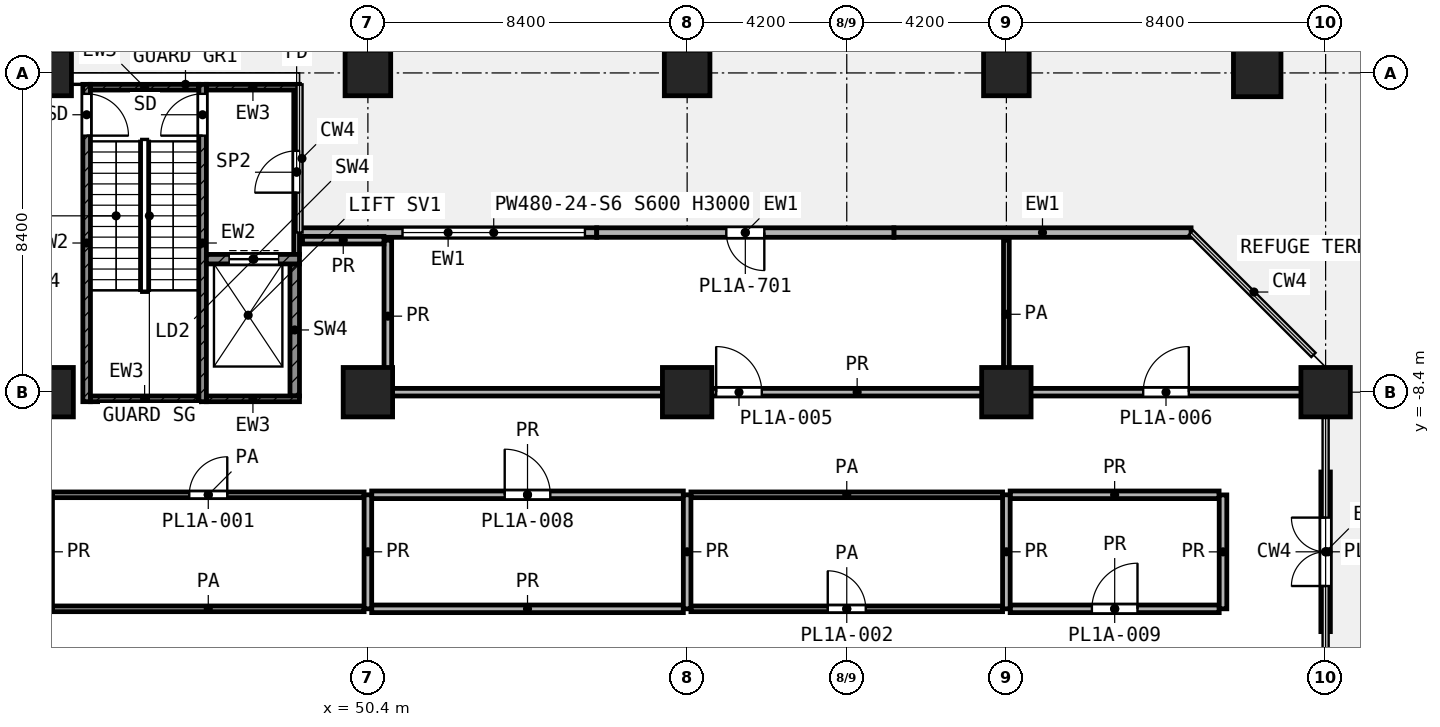
"""IFC4 building model, lengths in metres.
Left out: names, types, materials, properties, quantities, classifications, styles, units other than length and angle.
Written with IfcOpenShell. Run it as: python <this file> out.ifc"""

import sys

from ifc_helpers import new_model, si_unit, direction, frame, frame_2d, origin, origin_2d, place, context, subcontext, project, spatial, rectangle, extrude, element, fill, save


model = new_model("IFC4")
c1 = context("Model", 3, precision=1e-05, world=origin(), true_north=direction((0.0, 1.0)))
c2 = subcontext(c1, "Body", "Model", "MODEL_VIEW")
j1 = project(units=[si_unit("LENGTHUNIT", "METRE"), si_unit("PLANEANGLEUNIT", "RADIAN")], contexts=[c1])
p1 = place(None, origin())
s1 = spatial("IfcSite", under=j1, at=p1, CompositionType="ELEMENT")
p2 = place(p1, origin())
s2 = spatial("IfcBuilding", under=s1, at=p2, CompositionType="ELEMENT")
p3 = place(p2, frame((0.0, 0.0, 34.2)))
s3 = spatial("IfcBuildingStorey", under=s2, at=p3, CompositionType="ELEMENT", Elevation=34.2)
for number, where, z_axis, x_axis in (
    (1, (42.0, 0.0, 0.0), (0.0, 0.0, 1.0), (1.0, 0.0, 0.0)),
    (2, (50.4, 0.0, 0.0), (0.0, 0.0, 1.0), (1.0, 0.0, 0.0)),
    (3, (58.8, 0.0, 0.0), (0.0, 0.0, 1.0), (1.0, 0.0, 0.0)),
    (4, (67.2, 0.0, 0.0), (0.0, 0.0, 1.0), (1.0, 0.0, 0.0)),
):
    element("IfcColumn", number, at=place(p3, frame(where, z_axis=z_axis, x_axis=x_axis)), inside=s3, PredefinedType="COLUMN", context=c2, shape_type="SweptSolid", body=[
        extrude(rectangle(XDim=1.2, YDim=1.2, at=origin_2d()), origin(), (0.0, 0.0, 1.0), 5.0),
    ])
p4 = place(p3, frame((73.8, 0.0, 0.0), z_axis=(0.0, 0.0, 1.0), x_axis=(1.0, 0.0, 0.0)))
e5 = element("IfcColumn", 5, at=p4, inside=s3, PredefinedType="COLUMN", context=c2, shape_type="SweptSolid", body=[
    extrude(rectangle(XDim=1.25, YDim=1.25, at=origin_2d()), origin(), (0.0, 0.0, 1.0), 5.0),
])
for number, where, z_axis, x_axis in (
    (6, (42.0, -8.4, 0.0), (0.0, 0.0, 1.0), (1.0, 0.0, 0.0)),
    (7, (50.4, -8.4, 0.0), (0.0, 0.0, 1.0), (1.0, 0.0, 0.0)),
    (8, (58.8, -8.4, 0.0), (0.0, 0.0, 1.0), (1.0, 0.0, 0.0)),
    (9, (67.2, -8.4, 0.0), (0.0, 0.0, 1.0), (1.0, 0.0, 0.0)),
    (10, (75.6, -8.4, 0.0), (0.0, 0.0, 1.0), (1.0, 0.0, 0.0)),
):
    element("IfcColumn", number, at=place(p3, frame(where, z_axis=z_axis, x_axis=x_axis)), inside=s3, PredefinedType="COLUMN", context=c2, shape_type="SweptSolid", body=[
        extrude(rectangle(XDim=1.3, YDim=1.3, at=origin_2d()), origin(), (0.0, 0.0, 1.0), 5.0),
    ])
p5 = place(p3, frame((75.6, -14.7, 0.0), z_axis=(0.0, 0.0, 1.0), x_axis=(0.0, 1.0, 0.0)))
e11 = element("IfcWall", 11, at=p5, inside=s3, PredefinedType="SOLIDWALL", context=c2, shape_type="SweptSolid", body=[
    extrude(rectangle(XDim=4.2, YDim=0.25, at=frame_2d((2.1, 0.0))), origin(), (0.0, 0.0, 1.0), 4.42),
])
p6 = place(p5, frame((1.2, 0.0, 0.0)))
e12 = element("IfcOpeningElement", 12, at=p6, cuts=e11, PredefinedType="OPENING", context=c2, shape_type="SweptSolid", body=[
    extrude(rectangle(XDim=1.8, YDim=2.1, at=frame_2d((0.9, 1.05))), frame((0.0, 0.135, 0.0), z_axis=(0.0, -1.0, 0.0), x_axis=(1.0, 0.0, 0.0)), (0.0, 0.0, 1.0), 0.27),
])
p7 = place(p3, frame((72.06, -4.2, 0.0), z_axis=(0.0, 0.0, 1.0), x_axis=(-1.0, 0.0, 0.0)))
e13 = element("IfcWall", 13, at=p7, inside=s3, PredefinedType="SOLIDWALL", context=c2, shape_type="SweptSolid", body=[
    extrude(rectangle(XDim=7.82, YDim=0.25, at=frame_2d((3.91, 0.0))), origin(), (0.0, 0.0, 1.0), 4.58),
])
p8 = place(p3, frame((64.24, -4.2, 0.0), z_axis=(0.0, 0.0, 1.0), x_axis=(-1.0, 0.0, 0.0)))
e14 = element("IfcWall", 14, at=p8, inside=s3, PredefinedType="SOLIDWALL", context=c2, shape_type="SweptSolid", body=[
    extrude(rectangle(XDim=7.82, YDim=0.25, at=frame_2d((3.91, 0.0))), origin(), (0.0, 0.0, 1.0), 4.58),
])
p9 = place(p8, frame((3.409, 0.0, 0.0)))
e15 = element("IfcOpeningElement", 15, at=p9, cuts=e14, PredefinedType="OPENING", context=c2, shape_type="SweptSolid", body=[
    extrude(rectangle(XDim=1.0, YDim=2.1, at=frame_2d((0.5, 1.05))), frame((0.0, 0.135, 0.0), z_axis=(0.0, -1.0, 0.0), x_axis=(1.0, 0.0, 0.0)), (0.0, 0.0, 1.0), 0.27),
])
p10 = place(p3, frame((56.421, -4.2, 0.0), z_axis=(0.0, 0.0, 1.0), x_axis=(-1.0, 0.0, 0.0)))
e16 = element("IfcWall", 16, at=p10, inside=s3, PredefinedType="SOLIDWALL", context=c2, shape_type="SweptSolid", body=[
    extrude(rectangle(XDim=7.82, YDim=0.25, at=frame_2d((3.91, 0.0))), origin(), (0.0, 0.0, 1.0), 4.58),
])
p11 = place(p10, frame((0.31, 0.0, 0.6)))
e17 = element("IfcOpeningElement", 17, at=p11, cuts=e16, PredefinedType="OPENING", context=c2, shape_type="SweptSolid", body=[
    extrude(rectangle(XDim=4.8, YDim=2.4, at=frame_2d((2.4, 1.2))), frame((0.0, 0.135, 0.0), z_axis=(0.0, -1.0, 0.0), x_axis=(1.0, 0.0, 0.0)), (0.0, 0.0, 1.0), 0.27),
])
p12 = place(p3, frame((43.0, -8.65, 0.0), z_axis=(0.0, 0.0, 1.0), x_axis=(0.0, 1.0, 0.0)))
e18 = element("IfcWall", 18, at=p12, inside=s3, PredefinedType="SHEAR", context=c2, shape_type="SweptSolid", body=[
    extrude(rectangle(XDim=8.35, YDim=0.2, at=frame_2d((4.175, 0.0))), origin(), (0.0, 0.0, 1.0), 4.58),
])
p13 = place(p12, frame((7.0, 0.0, 0.0)))
e19 = element("IfcOpeningElement", 19, at=p13, cuts=e18, PredefinedType="OPENING", context=c2, shape_type="SweptSolid", body=[
    extrude(rectangle(XDim=1.1, YDim=2.1, at=frame_2d((0.55, 1.05))), frame((0.0, 0.11, 0.0), z_axis=(0.0, -1.0, 0.0), x_axis=(1.0, 0.0, 0.0)), (0.0, 0.0, 1.0), 0.22),
])
p14 = place(p3, frame((46.05, -8.65, 0.0), z_axis=(0.0, 0.0, 1.0), x_axis=(0.0, 1.0, 0.0)))
e20 = element("IfcWall", 20, at=p14, inside=s3, PredefinedType="SHEAR", context=c2, shape_type="SweptSolid", body=[
    extrude(rectangle(XDim=8.35, YDim=0.2, at=frame_2d((4.175, 0.0))), origin(), (0.0, 0.0, 1.0), 4.58),
])
p15 = place(p14, frame((7.0, 0.0, 0.0)))
e21 = element("IfcOpeningElement", 21, at=p15, cuts=e20, PredefinedType="OPENING", context=c2, shape_type="SweptSolid", body=[
    extrude(rectangle(XDim=1.1, YDim=2.1, at=frame_2d((0.55, 1.05))), frame((0.0, 0.11, 0.0), z_axis=(0.0, -1.0, 0.0), x_axis=(1.0, 0.0, 0.0)), (0.0, 0.0, 1.0), 0.22),
])
p16 = place(p3, frame((43.1, -0.375, 0.0), z_axis=(0.0, 0.0, 1.0), x_axis=(1.0, 0.0, 0.0)))
e22 = element("IfcWall", 22, at=p16, inside=s3, PredefinedType="SHEAR", context=c2, shape_type="SweptSolid", body=[
    extrude(rectangle(XDim=2.85, YDim=0.15, at=frame_2d((1.425, 0.0))), origin(), (0.0, 0.0, 1.0), 4.58),
])
p17 = place(p3, frame((46.15, -0.375, 0.0), z_axis=(0.0, 0.0, 1.0), x_axis=(1.0, 0.0, 0.0)))
e23 = element("IfcWall", 23, at=p17, inside=s3, PredefinedType="SHEAR", context=c2, shape_type="SweptSolid", body=[
    extrude(rectangle(XDim=2.45, YDim=0.15, at=frame_2d((1.225, 0.0))), origin(), (0.0, 0.0, 1.0), 4.58),
])
p18 = place(p3, frame((43.1, -8.575, 0.0), z_axis=(0.0, 0.0, 1.0), x_axis=(1.0, 0.0, 0.0)))
e24 = element("IfcWall", 24, at=p18, inside=s3, PredefinedType="SHEAR", context=c2, shape_type="SweptSolid", body=[
    extrude(rectangle(XDim=2.85, YDim=0.15, at=frame_2d((1.425, 0.0))), origin(), (0.0, 0.0, 1.0), 4.58),
])
p19 = place(p3, frame((46.15, -8.575, 0.0), z_axis=(0.0, 0.0, 1.0), x_axis=(1.0, 0.0, 0.0)))
e25 = element("IfcWall", 25, at=p19, inside=s3, PredefinedType="SHEAR", context=c2, shape_type="SweptSolid", body=[
    extrude(rectangle(XDim=2.45, YDim=0.15, at=frame_2d((1.225, 0.0))), origin(), (0.0, 0.0, 1.0), 4.58),
])
p20 = place(p3, frame((46.15, -4.9, 0.0), z_axis=(0.0, 0.0, 1.0), x_axis=(1.0, 0.0, 0.0)))
e26 = element("IfcWall", 26, at=p20, inside=s3, PredefinedType="SHEAR", context=c2, shape_type="SweptSolid", body=[
    extrude(rectangle(XDim=2.45, YDim=0.25, at=frame_2d((1.225, 0.0))), origin(), (0.0, 0.0, 1.0), 4.58),
])
p21 = place(p20, frame((0.6, 0.0, 0.0)))
e27 = element("IfcOpeningElement", 27, at=p21, cuts=e26, PredefinedType="OPENING", context=c2, shape_type="SweptSolid", body=[
    extrude(rectangle(XDim=1.3, YDim=2.1, at=frame_2d((0.65, 1.05))), frame((0.0, 0.135, 0.0), z_axis=(0.0, -1.0, 0.0), x_axis=(1.0, 0.0, 0.0)), (0.0, 0.0, 1.0), 0.27),
])
p22 = place(p3, frame((48.475, -8.5, 0.0), z_axis=(0.0, 0.0, 1.0), x_axis=(0.0, 1.0, 0.0)))
e28 = element("IfcWall", 28, at=p22, inside=s3, PredefinedType="SHEAR", context=c2, shape_type="SweptSolid", body=[
    extrude(rectangle(XDim=3.475, YDim=0.25, at=frame_2d((1.738, 0.0))), origin(), (0.0, 0.0, 1.0), 4.58),
])
p23 = place(p3, frame((48.525, -4.775, 0.0), z_axis=(0.0, 0.0, 1.0), x_axis=(0.0, 1.0, 0.0)))
e29 = element("IfcWall", 29, at=p23, inside=s3, PredefinedType="PARTITIONING", context=c2, shape_type="SweptSolid", body=[
    extrude(rectangle(XDim=4.325, YDim=0.15, at=frame_2d((2.163, 0.0))), origin(), (0.0, 0.0, 1.0), 4.58),
])
p24 = place(p23, frame((1.625, 0.0, 0.0)))
e30 = element("IfcOpeningElement", 30, at=p24, cuts=e29, PredefinedType="OPENING", context=c2, shape_type="SweptSolid", body=[
    extrude(rectangle(XDim=1.1, YDim=2.1, at=frame_2d((0.55, 1.05))), frame((0.0, 0.085, 0.0), z_axis=(0.0, -1.0, 0.0), x_axis=(1.0, 0.0, 0.0)), (0.0, 0.0, 1.0), 0.17),
])
p25 = place(p3, frame((42.1, -14.1, 0.0), z_axis=(0.0, 0.0, 1.0), x_axis=(1.0, 0.0, 0.0)))
e31 = element("IfcWall", 31, at=p25, inside=s3, PredefinedType="PARTITIONING", context=c2, shape_type="SweptSolid", body=[
    extrude(rectangle(XDim=8.2, YDim=0.15, at=frame_2d((4.1, 0.0))), origin(), (0.0, 0.0, 1.0), 4.58),
])
p26 = place(p3, frame((58.9, -14.1, 0.0), z_axis=(0.0, 0.0, 1.0), x_axis=(1.0, 0.0, 0.0)))
e32 = element("IfcWall", 32, at=p26, inside=s3, PredefinedType="PARTITIONING", context=c2, shape_type="SweptSolid", body=[
    extrude(rectangle(XDim=8.2, YDim=0.15, at=frame_2d((4.1, 0.0))), origin(), (0.0, 0.0, 1.0), 4.58),
])
p27 = place(p26, frame((3.6, 0.0, 0.0)))
e33 = element("IfcOpeningElement", 33, at=p27, cuts=e32, PredefinedType="OPENING", context=c2, shape_type="SweptSolid", body=[
    extrude(rectangle(XDim=1.0, YDim=2.1, at=frame_2d((0.5, 1.05))), frame((0.0, 0.085, 0.0), z_axis=(0.0, -1.0, 0.0), x_axis=(1.0, 0.0, 0.0)), (0.0, 0.0, 1.0), 0.17),
])
p28 = place(p3, frame((42.1, -11.1, 0.0), z_axis=(0.0, 0.0, 1.0), x_axis=(1.0, 0.0, 0.0)))
e34 = element("IfcWall", 34, at=p28, inside=s3, PredefinedType="PARTITIONING", context=c2, shape_type="SweptSolid", body=[
    extrude(rectangle(XDim=8.2, YDim=0.15, at=frame_2d((4.1, 0.0))), origin(), (0.0, 0.0, 1.0), 4.58),
])
p29 = place(p28, frame((3.6, 0.0, 0.0)))
e35 = element("IfcOpeningElement", 35, at=p29, cuts=e34, PredefinedType="OPENING", context=c2, shape_type="SweptSolid", body=[
    extrude(rectangle(XDim=1.0, YDim=2.1, at=frame_2d((0.5, 1.05))), frame((0.0, 0.085, 0.0), z_axis=(0.0, -1.0, 0.0), x_axis=(1.0, 0.0, 0.0)), (0.0, 0.0, 1.0), 0.17),
])
p30 = place(p3, frame((58.9, -11.1, 0.0), z_axis=(0.0, 0.0, 1.0), x_axis=(1.0, 0.0, 0.0)))
e36 = element("IfcWall", 36, at=p30, inside=s3, PredefinedType="PARTITIONING", context=c2, shape_type="SweptSolid", body=[
    extrude(rectangle(XDim=8.2, YDim=0.15, at=frame_2d((4.1, 0.0))), origin(), (0.0, 0.0, 1.0), 4.58),
])
p31 = place(p3, frame((67.2, -8.3, 0.0), z_axis=(0.0, 0.0, 1.0), x_axis=(0.0, 1.0, 0.0)))
e37 = element("IfcWall", 37, at=p31, inside=s3, PredefinedType="PARTITIONING", context=c2, shape_type="SweptSolid", body=[
    extrude(rectangle(XDim=3.9, YDim=0.15, at=frame_2d((1.95, 0.0))), origin(), (0.0, 0.0, 1.0), 4.58),
])
p32 = place(p3, frame((50.5, -14.1, 0.0), z_axis=(0.0, 0.0, 1.0), x_axis=(1.0, 0.0, 0.0)))
e38 = element("IfcWall", 38, at=p32, inside=s3, PredefinedType="PARTITIONING", context=c2, shape_type="SweptSolid", body=[
    extrude(rectangle(XDim=8.2, YDim=0.2, at=frame_2d((4.1, 0.0))), origin(), (0.0, 0.0, 1.0), 4.58),
])
p33 = place(p3, frame((67.3, -14.1, 0.0), z_axis=(0.0, 0.0, 1.0), x_axis=(1.0, 0.0, 0.0)))
e39 = element("IfcWall", 39, at=p33, inside=s3, PredefinedType="PARTITIONING", context=c2, shape_type="SweptSolid", body=[
    extrude(rectangle(XDim=5.5, YDim=0.2, at=frame_2d((2.75, 0.0))), origin(), (0.0, 0.0, 1.0), 4.58),
])
p34 = place(p33, frame((2.15, 0.0, 0.0)))
e40 = element("IfcOpeningElement", 40, at=p34, cuts=e39, PredefinedType="OPENING", context=c2, shape_type="SweptSolid", body=[
    extrude(rectangle(XDim=1.2, YDim=2.1, at=frame_2d((0.6, 1.05))), frame((0.0, 0.11, 0.0), z_axis=(0.0, -1.0, 0.0), x_axis=(1.0, 0.0, 0.0)), (0.0, 0.0, 1.0), 0.22),
])
p35 = place(p3, frame((50.5, -11.1, 0.0), z_axis=(0.0, 0.0, 1.0), x_axis=(1.0, 0.0, 0.0)))
e41 = element("IfcWall", 41, at=p35, inside=s3, PredefinedType="PARTITIONING", context=c2, shape_type="SweptSolid", body=[
    extrude(rectangle(XDim=8.2, YDim=0.2, at=frame_2d((4.1, 0.0))), origin(), (0.0, 0.0, 1.0), 4.58),
])
p36 = place(p35, frame((3.5, 0.0, 0.0)))
e42 = element("IfcOpeningElement", 42, at=p36, cuts=e41, PredefinedType="OPENING", context=c2, shape_type="SweptSolid", body=[
    extrude(rectangle(XDim=1.2, YDim=2.1, at=frame_2d((0.6, 1.05))), frame((0.0, 0.11, 0.0), z_axis=(0.0, -1.0, 0.0), x_axis=(1.0, 0.0, 0.0)), (0.0, 0.0, 1.0), 0.22),
])
p37 = place(p3, frame((67.3, -11.1, 0.0), z_axis=(0.0, 0.0, 1.0), x_axis=(1.0, 0.0, 0.0)))
e43 = element("IfcWall", 43, at=p37, inside=s3, PredefinedType="PARTITIONING", context=c2, shape_type="SweptSolid", body=[
    extrude(rectangle(XDim=5.497, YDim=0.2, at=frame_2d((2.749, 0.0))), origin(), (0.0, 0.0, 1.0), 4.58),
])
p38 = place(p3, frame((51.027, -8.4, 0.0), z_axis=(0.0, 0.0, 1.0), x_axis=(1.0, 0.0, 0.0)))
e44 = element("IfcWall", 44, at=p38, inside=s3, PredefinedType="PARTITIONING", context=c2, shape_type="SweptSolid", body=[
    extrude(rectangle(XDim=24.493, YDim=0.2, at=frame_2d((12.247, 0.0))), origin(), (0.0, 0.0, 1.0), 4.58),
])
p39 = place(p38, frame((8.537, 0.0, 0.0)))
e45 = element("IfcOpeningElement", 45, at=p39, cuts=e44, PredefinedType="OPENING", context=c2, shape_type="SweptSolid", body=[
    extrude(rectangle(XDim=1.2, YDim=2.1, at=frame_2d((0.6, 1.05))), frame((0.0, 0.11, 0.0), z_axis=(0.0, -1.0, 0.0), x_axis=(1.0, 0.0, 0.0)), (0.0, 0.0, 1.0), 0.22),
])
p40 = place(p38, frame((19.773, 0.0, 0.0)))
e46 = element("IfcOpeningElement", 46, at=p40, cuts=e44, PredefinedType="OPENING", context=c2, shape_type="SweptSolid", body=[
    extrude(rectangle(XDim=1.2, YDim=2.1, at=frame_2d((0.6, 1.05))), frame((0.0, 0.11, 0.0), z_axis=(0.0, -1.0, 0.0), x_axis=(1.0, 0.0, 0.0)), (0.0, 0.0, 1.0), 0.22),
])
p41 = place(p3, frame((48.68, -4.4, 0.0), z_axis=(0.0, 0.0, 1.0), x_axis=(1.0, 0.0, 0.0)))
e47 = element("IfcWall", 47, at=p41, inside=s3, PredefinedType="PARTITIONING", context=c2, shape_type="SweptSolid", body=[
    extrude(rectangle(XDim=2.143, YDim=0.2, at=frame_2d((1.072, 0.0))), origin(), (0.0, 0.0, 1.0), 4.58),
])
p42 = place(p3, frame((50.4, -14.1, 0.0), z_axis=(0.0, 0.0, 1.0), x_axis=(0.0, 1.0, 0.0)))
e48 = element("IfcWall", 48, at=p42, inside=s3, PredefinedType="PARTITIONING", context=c2, shape_type="SweptSolid", body=[
    extrude(rectangle(XDim=3.0, YDim=0.2, at=frame_2d((1.5, 0.0))), origin(), (0.0, 0.0, 1.0), 4.58),
])
p43 = place(p3, frame((50.925, -8.398, 0.0), z_axis=(0.0, 0.0, 1.0), x_axis=(0.0, 1.0, 0.0)))
e49 = element("IfcWall", 49, at=p43, inside=s3, PredefinedType="PARTITIONING", context=c2, shape_type="SweptSolid", body=[
    extrude(rectangle(XDim=3.997, YDim=0.2, at=frame_2d((1.999, 0.0))), origin(), (0.0, 0.0, 1.0), 4.58),
])
for number, where, z_axis, x_axis in (
    (50, (58.8, -14.1, 0.0), (0.0, 0.0, 1.0), (0.0, 1.0, 0.0)),
    (51, (67.2, -14.1, 0.0), (0.0, 0.0, 1.0), (0.0, 1.0, 0.0)),
):
    element("IfcWall", number, at=place(p3, frame(where, z_axis=z_axis, x_axis=x_axis)), inside=s3, PredefinedType="PARTITIONING", context=c2, shape_type="SweptSolid", body=[
        extrude(rectangle(XDim=3.0, YDim=0.2, at=frame_2d((1.5, 0.0))), origin(), (0.0, 0.0, 1.0), 4.58),
    ])
p44 = place(p3, frame((72.9, -14.1, 0.0), z_axis=(0.0, 0.0, 1.0), x_axis=(0.0, 1.0, 0.0)))
e52 = element("IfcWall", 52, at=p44, inside=s3, PredefinedType="PARTITIONING", context=c2, shape_type="SweptSolid", body=[
    extrude(rectangle(XDim=2.997, YDim=0.2, at=frame_2d((1.499, 0.0))), origin(), (0.0, 0.0, 1.0), 4.58),
])
p45 = place(p6, origin())
e53 = element("IfcDoor", 53, at=p45, inside=s3, OperationType="DOUBLE_DOOR_SINGLE_SWING", PredefinedType="DOOR", context=c2, shape_type="SweptSolid", body=[
    extrude(rectangle(XDim=1.8, YDim=2.1, at=frame_2d((0.9, 1.05))), frame((0.0, 0.025, 0.0), z_axis=(0.0, -1.0, 0.0), x_axis=(1.0, 0.0, 0.0)), (0.0, 0.0, 1.0), 0.05),
])
fill(e12, e53)
p46 = place(p9, origin())
e54 = element("IfcDoor", 54, at=p46, inside=s3, OperationType="SINGLE_SWING_LEFT", PredefinedType="DOOR", context=c2, shape_type="SweptSolid", body=[
    extrude(rectangle(XDim=1.0, YDim=2.1, at=frame_2d((0.5, 1.05))), frame((0.0, 0.025, 0.0), z_axis=(0.0, -1.0, 0.0), x_axis=(1.0, 0.0, 0.0)), (0.0, 0.0, 1.0), 0.05),
])
fill(e15, e54)
p47 = place(p11, origin())
e55 = element("IfcWindow", 55, at=p47, inside=s3, PartitioningType="SINGLE_PANEL", PredefinedType="WINDOW", context=c2, shape_type="SweptSolid", body=[
    extrude(rectangle(XDim=4.8, YDim=2.4, at=frame_2d((2.4, 1.2))), frame((0.0, 0.03, 0.0), z_axis=(0.0, -1.0, 0.0), x_axis=(1.0, 0.0, 0.0)), (0.0, 0.0, 1.0), 0.06),
])
fill(e17, e55)
p48 = place(p13, frame((1.1, 0.0, 0.0), z_axis=(0.0, 0.0, 1.0), x_axis=(-1.0, 0.0, 0.0)))
e56 = element("IfcDoor", 56, at=p48, inside=s3, OperationType="SINGLE_SWING_LEFT", PredefinedType="DOOR", context=c2, shape_type="SweptSolid", body=[
    extrude(rectangle(XDim=1.1, YDim=2.1, at=frame_2d((0.55, 1.05))), frame((0.0, 0.025, 0.0), z_axis=(0.0, -1.0, 0.0), x_axis=(1.0, 0.0, 0.0)), (0.0, 0.0, 1.0), 0.05),
])
fill(e19, e56)
p49 = place(p15, origin())
e57 = element("IfcDoor", 57, at=p49, inside=s3, OperationType="SINGLE_SWING_LEFT", PredefinedType="DOOR", context=c2, shape_type="SweptSolid", body=[
    extrude(rectangle(XDim=1.1, YDim=2.1, at=frame_2d((0.55, 1.05))), frame((0.0, 0.025, 0.0), z_axis=(0.0, -1.0, 0.0), x_axis=(1.0, 0.0, 0.0)), (0.0, 0.0, 1.0), 0.05),
])
fill(e21, e57)
p50 = place(p21, origin())
e58 = element("IfcDoor", 58, at=p50, inside=s3, OperationType="DOUBLE_DOOR_SLIDING", PredefinedType="DOOR", context=c2, shape_type="SweptSolid", body=[
    extrude(rectangle(XDim=1.3, YDim=2.1, at=frame_2d((0.65, 1.05))), frame((0.0, 0.025, 0.0), z_axis=(0.0, -1.0, 0.0), x_axis=(1.0, 0.0, 0.0)), (0.0, 0.0, 1.0), 0.05),
])
fill(e27, e58)
p51 = place(p24, origin())
e59 = element("IfcDoor", 59, at=p51, inside=s3, OperationType="SINGLE_SWING_LEFT", PredefinedType="DOOR", context=c2, shape_type="SweptSolid", body=[
    extrude(rectangle(XDim=1.1, YDim=2.1, at=frame_2d((0.55, 1.05))), frame((0.0, 0.025, 0.0), z_axis=(0.0, -1.0, 0.0), x_axis=(1.0, 0.0, 0.0)), (0.0, 0.0, 1.0), 0.05),
])
fill(e30, e59)
p52 = place(p39, origin())
e60 = element("IfcDoor", 60, at=p52, inside=s3, OperationType="SINGLE_SWING_LEFT", PredefinedType="DOOR", context=c2, shape_type="SweptSolid", body=[
    extrude(rectangle(XDim=1.2, YDim=2.1, at=frame_2d((0.6, 1.05))), frame((0.0, 0.025, 0.0), z_axis=(0.0, -1.0, 0.0), x_axis=(1.0, 0.0, 0.0)), (0.0, 0.0, 1.0), 0.05),
])
fill(e45, e60)
p53 = place(p40, origin())
e61 = element("IfcDoor", 61, at=p53, inside=s3, OperationType="SINGLE_SWING_RIGHT", PredefinedType="DOOR", context=c2, shape_type="SweptSolid", body=[
    extrude(rectangle(XDim=1.2, YDim=2.1, at=frame_2d((0.6, 1.05))), frame((0.0, 0.025, 0.0), z_axis=(0.0, -1.0, 0.0), x_axis=(1.0, 0.0, 0.0)), (0.0, 0.0, 1.0), 0.05),
])
fill(e46, e61)
p54 = place(p29, origin())
e62 = element("IfcDoor", 62, at=p54, inside=s3, OperationType="SINGLE_SWING_RIGHT", PredefinedType="DOOR", context=c2, shape_type="SweptSolid", body=[
    extrude(rectangle(XDim=1.0, YDim=2.1, at=frame_2d((0.5, 1.05))), frame((0.0, 0.025, 0.0), z_axis=(0.0, -1.0, 0.0), x_axis=(1.0, 0.0, 0.0)), (0.0, 0.0, 1.0), 0.05),
])
fill(e35, e62)
p55 = place(p36, origin())
e63 = element("IfcDoor", 63, at=p55, inside=s3, OperationType="SINGLE_SWING_LEFT", PredefinedType="DOOR", context=c2, shape_type="SweptSolid", body=[
    extrude(rectangle(XDim=1.2, YDim=2.1, at=frame_2d((0.6, 1.05))), frame((0.0, 0.025, 0.0), z_axis=(0.0, -1.0, 0.0), x_axis=(1.0, 0.0, 0.0)), (0.0, 0.0, 1.0), 0.05),
])
fill(e42, e63)
p56 = place(p27, origin())
e64 = element("IfcDoor", 64, at=p56, inside=s3, OperationType="SINGLE_SWING_LEFT", PredefinedType="DOOR", context=c2, shape_type="SweptSolid", body=[
    extrude(rectangle(XDim=1.0, YDim=2.1, at=frame_2d((0.5, 1.05))), frame((0.0, 0.025, 0.0), z_axis=(0.0, -1.0, 0.0), x_axis=(1.0, 0.0, 0.0)), (0.0, 0.0, 1.0), 0.05),
])
fill(e33, e64)
p57 = place(p34, origin())
e65 = element("IfcDoor", 65, at=p57, inside=s3, OperationType="SINGLE_SWING_RIGHT", PredefinedType="DOOR", context=c2, shape_type="SweptSolid", body=[
    extrude(rectangle(XDim=1.2, YDim=2.1, at=frame_2d((0.6, 1.05))), frame((0.0, 0.025, 0.0), z_axis=(0.0, -1.0, 0.0), x_axis=(1.0, 0.0, 0.0)), (0.0, 0.0, 1.0), 0.05),
])
fill(e40, e65)
save(model, sys.argv[1])
